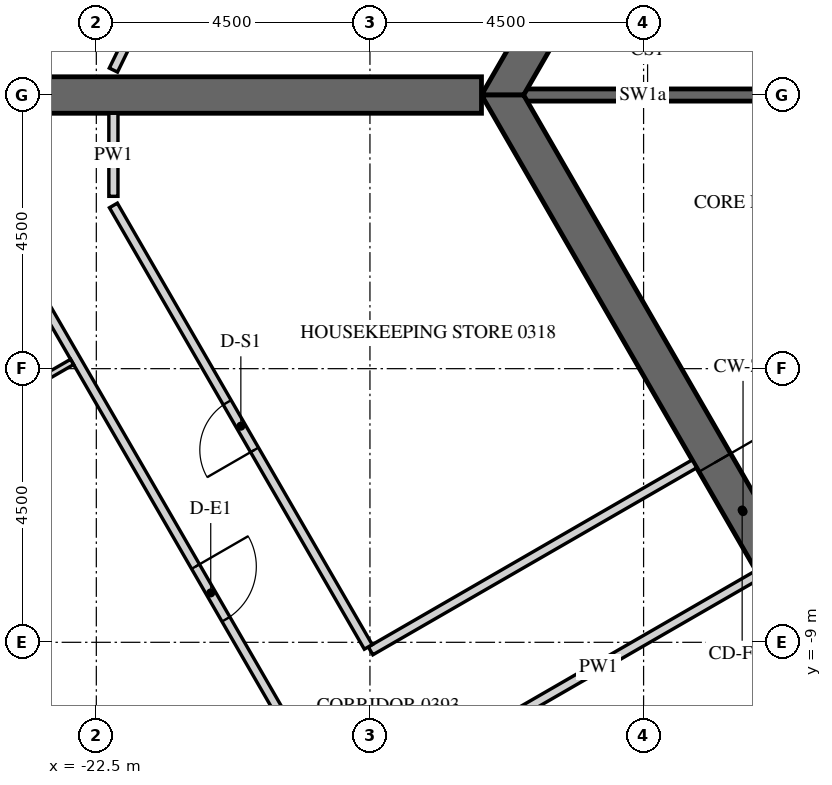
"""IFC4 building model, lengths in metres.
Left out: names, types, materials, properties, quantities, classifications, styles, units other than length and angle.
Written with IfcOpenShell. Run it as: python <this file> out.ifc"""

import sys

from ifc_helpers import new_model, si_unit, direction, frame, frame_2d, origin, place, context, subcontext, project, spatial, polyline, rectangle, outline, extrude, element, fill, save


model = new_model("IFC4")
c1 = context("Model", 3, precision=1e-05, world=origin(), true_north=direction((0.0, 1.0)))
c2 = subcontext(c1, "Body", "Model", "MODEL_VIEW")
j1 = project(units=[si_unit("LENGTHUNIT", "METRE"), si_unit("PLANEANGLEUNIT", "RADIAN")], contexts=[c1])
p1 = place(None, origin())
s1 = spatial("IfcSite", under=j1, at=p1, CompositionType="ELEMENT")
p2 = place(p1, origin())
s2 = spatial("IfcBuilding", under=s1, at=p2, CompositionType="ELEMENT")
p3 = place(p2, frame((0.0, 0.0, 60.9)))
s3 = spatial("IfcBuildingStorey", under=s2, at=p3, CompositionType="ELEMENT", Elevation=60.9)
p4 = place(p3, frame((-19.595, 27.633, -0.15), z_axis=(0.0, 0.0, 1.0), x_axis=(-0.438368285794, -0.898795441694, 0.0)))
e1 = element("IfcWall", 1, at=p4, inside=s3, PredefinedType="SOLIDWALL", context=c2, shape_type="SweptSolid", body=[
    extrude(outline(polyline([(-0.026, -0.275), (30.093, -0.275), (30.048, 0.275), (0.026, 0.275), (-0.026, -0.275)])), origin(), (0.0, 0.0, 1.0), 3.9),
])
p5 = place(p4, frame((1.236, 0.0, 1.05)))
e2 = element("IfcOpeningElement", 2, at=p5, cuts=e1, PredefinedType="OPENING", context=c2, shape_type="SweptSolid", body=[
    extrude(rectangle(XDim=2.4, YDim=2.4, at=frame_2d((1.2, 1.2))), frame((0.0, 0.285, 0.0), z_axis=(0.0, -1.0, 0.0), x_axis=(1.0, 0.0, 0.0)), (0.0, 0.0, 1.0), 0.57),
])
p6 = place(p4, frame((4.835, 0.0, 1.05)))
e3 = element("IfcOpeningElement", 3, at=p6, cuts=e1, PredefinedType="OPENING", context=c2, shape_type="SweptSolid", body=[
    extrude(rectangle(XDim=2.4, YDim=2.4, at=frame_2d((1.2, 1.2))), frame((0.0, 0.285, 0.0), z_axis=(0.0, -1.0, 0.0), x_axis=(1.0, 0.0, 0.0)), (0.0, 0.0, 1.0), 0.57),
])
p7 = place(p4, frame((8.436, 0.0, 1.05)))
e4 = element("IfcOpeningElement", 4, at=p7, cuts=e1, PredefinedType="OPENING", context=c2, shape_type="SweptSolid", body=[
    extrude(rectangle(XDim=2.4, YDim=2.4, at=frame_2d((1.2, 1.2))), frame((0.0, 0.285, 0.0), z_axis=(0.0, -1.0, 0.0), x_axis=(1.0, 0.0, 0.0)), (0.0, 0.0, 1.0), 0.57),
])
p8 = place(p4, frame((12.035, 0.0, 1.05)))
e5 = element("IfcOpeningElement", 5, at=p8, cuts=e1, PredefinedType="OPENING", context=c2, shape_type="SweptSolid", body=[
    extrude(rectangle(XDim=2.4, YDim=2.4, at=frame_2d((1.2, 1.2))), frame((0.0, 0.285, 0.0), z_axis=(0.0, -1.0, 0.0), x_axis=(1.0, 0.0, 0.0)), (0.0, 0.0, 1.0), 0.57),
])
p9 = place(p4, frame((15.635, 0.0, 1.05)))
e6 = element("IfcOpeningElement", 6, at=p9, cuts=e1, PredefinedType="OPENING", context=c2, shape_type="SweptSolid", body=[
    extrude(rectangle(XDim=2.4, YDim=2.4, at=frame_2d((1.2, 1.2))), frame((0.0, 0.285, 0.0), z_axis=(0.0, -1.0, 0.0), x_axis=(1.0, 0.0, 0.0)), (0.0, 0.0, 1.0), 0.57),
])
p10 = place(p4, frame((19.236, 0.0, 1.05)))
e7 = element("IfcOpeningElement", 7, at=p10, cuts=e1, PredefinedType="OPENING", context=c2, shape_type="SweptSolid", body=[
    extrude(rectangle(XDim=2.4, YDim=2.4, at=frame_2d((1.2, 1.2))), frame((0.0, 0.285, 0.0), z_axis=(0.0, -1.0, 0.0), x_axis=(1.0, 0.0, 0.0)), (0.0, 0.0, 1.0), 0.57),
])
p11 = place(p4, frame((22.835, 0.0, 1.05)))
e8 = element("IfcOpeningElement", 8, at=p11, cuts=e1, PredefinedType="OPENING", context=c2, shape_type="SweptSolid", body=[
    extrude(rectangle(XDim=2.4, YDim=2.4, at=frame_2d((1.2, 1.2))), frame((0.0, 0.285, 0.0), z_axis=(0.0, -1.0, 0.0), x_axis=(1.0, 0.0, 0.0)), (0.0, 0.0, 1.0), 0.57),
])
p12 = place(p4, frame((26.436, 0.0, 1.05)))
e9 = element("IfcOpeningElement", 9, at=p12, cuts=e1, PredefinedType="OPENING", context=c2, shape_type="SweptSolid", body=[
    extrude(rectangle(XDim=2.4, YDim=2.4, at=frame_2d((1.2, 1.2))), frame((0.0, 0.285, 0.0), z_axis=(0.0, -1.0, 0.0), x_axis=(1.0, 0.0, 0.0)), (0.0, 0.0, 1.0), 0.57),
])
p13 = place(p3, frame((-32.655, -2.89, -0.15), z_axis=(0.0, 0.0, 1.0), x_axis=(0.499997711317, -0.866026725152, 0.0)))
e10 = element("IfcWall", 10, at=p13, inside=s3, PredefinedType="SOLIDWALL", context=c2, shape_type="SweptSolid", body=[
    extrude(outline(polyline([(-0.022, -0.275), (30.097, -0.275), (30.045, 0.275), (0.022, 0.275), (-0.022, -0.275)])), origin(), (0.0, 0.0, 1.0), 3.9),
])
p14 = place(p13, frame((1.236, 0.0, 1.05)))
e11 = element("IfcOpeningElement", 11, at=p14, cuts=e10, PredefinedType="OPENING", context=c2, shape_type="SweptSolid", body=[
    extrude(rectangle(XDim=2.4, YDim=2.4, at=frame_2d((1.2, 1.2))), frame((0.0, 0.285, 0.0), z_axis=(0.0, -1.0, 0.0), x_axis=(1.0, 0.0, 0.0)), (0.0, 0.0, 1.0), 0.57),
])
p15 = place(p13, frame((4.835, 0.0, 1.05)))
e12 = element("IfcOpeningElement", 12, at=p15, cuts=e10, PredefinedType="OPENING", context=c2, shape_type="SweptSolid", body=[
    extrude(rectangle(XDim=2.4, YDim=2.4, at=frame_2d((1.2, 1.2))), frame((0.0, 0.285, 0.0), z_axis=(0.0, -1.0, 0.0), x_axis=(1.0, 0.0, 0.0)), (0.0, 0.0, 1.0), 0.57),
])
p16 = place(p13, frame((8.436, 0.0, 1.05)))
e13 = element("IfcOpeningElement", 13, at=p16, cuts=e10, PredefinedType="OPENING", context=c2, shape_type="SweptSolid", body=[
    extrude(rectangle(XDim=2.4, YDim=2.4, at=frame_2d((1.2, 1.2))), frame((0.0, 0.285, 0.0), z_axis=(0.0, -1.0, 0.0), x_axis=(1.0, 0.0, 0.0)), (0.0, 0.0, 1.0), 0.57),
])
p17 = place(p13, frame((12.035, 0.0, 1.05)))
e14 = element("IfcOpeningElement", 14, at=p17, cuts=e10, PredefinedType="OPENING", context=c2, shape_type="SweptSolid", body=[
    extrude(rectangle(XDim=2.4, YDim=2.4, at=frame_2d((1.2, 1.2))), frame((0.0, 0.285, 0.0), z_axis=(0.0, -1.0, 0.0), x_axis=(1.0, 0.0, 0.0)), (0.0, 0.0, 1.0), 0.57),
])
p18 = place(p13, frame((15.635, 0.0, 1.05)))
e15 = element("IfcOpeningElement", 15, at=p18, cuts=e10, PredefinedType="OPENING", context=c2, shape_type="SweptSolid", body=[
    extrude(rectangle(XDim=2.4, YDim=2.4, at=frame_2d((1.2, 1.2))), frame((0.0, 0.285, 0.0), z_axis=(0.0, -1.0, 0.0), x_axis=(1.0, 0.0, 0.0)), (0.0, 0.0, 1.0), 0.57),
])
p19 = place(p13, frame((19.236, 0.0, 1.05)))
e16 = element("IfcOpeningElement", 16, at=p19, cuts=e10, PredefinedType="OPENING", context=c2, shape_type="SweptSolid", body=[
    extrude(rectangle(XDim=2.4, YDim=2.4, at=frame_2d((1.2, 1.2))), frame((0.0, 0.285, 0.0), z_axis=(0.0, -1.0, 0.0), x_axis=(1.0, 0.0, 0.0)), (0.0, 0.0, 1.0), 0.57),
])
p20 = place(p13, frame((22.835, 0.0, 1.05)))
e17 = element("IfcOpeningElement", 17, at=p20, cuts=e10, PredefinedType="OPENING", context=c2, shape_type="SweptSolid", body=[
    extrude(rectangle(XDim=2.4, YDim=2.4, at=frame_2d((1.2, 1.2))), frame((0.0, 0.285, 0.0), z_axis=(0.0, -1.0, 0.0), x_axis=(1.0, 0.0, 0.0)), (0.0, 0.0, 1.0), 0.57),
])
p21 = place(p13, frame((26.436, 0.0, 1.05)))
e18 = element("IfcOpeningElement", 18, at=p21, cuts=e10, PredefinedType="OPENING", context=c2, shape_type="SweptSolid", body=[
    extrude(rectangle(XDim=2.4, YDim=2.4, at=frame_2d((1.2, 1.2))), frame((0.0, 0.285, 0.0), z_axis=(0.0, -1.0, 0.0), x_axis=(1.0, 0.0, 0.0)), (0.0, 0.0, 1.0), 0.57),
])
p22 = place(p3, frame((-7.91, 13.7, -0.15), z_axis=(0.0, 0.0, 1.0), x_axis=(-0.499999880136, -0.866025472988, 0.0)))
e19 = element("IfcWall", 19, at=p22, inside=s3, PredefinedType="SHEAR", context=c2, shape_type="SweptSolid", body=[
    extrude(outline(polyline([(-0.173, -0.3), (15.993, -0.3), (15.646, 0.3), (0.173, 0.3), (-0.173, -0.3)])), origin(), (0.0, 0.0, 1.0), 3.9),
])
p23 = place(p22, frame((7.039, 0.0, 0.15)))
e20 = element("IfcOpeningElement", 20, at=p23, cuts=e19, PredefinedType="OPENING", context=c2, shape_type="SweptSolid", body=[
    extrude(rectangle(XDim=1.8, YDim=2.4, at=frame_2d((0.9, 1.2))), frame((0.0, 0.31, 0.0), z_axis=(0.0, -1.0, 0.0), x_axis=(1.0, 0.0, 0.0)), (0.0, 0.0, 1.0), 0.62),
])
p24 = place(p3, frame((-15.819, 0.0, -0.15), z_axis=(0.0, 0.0, 1.0), x_axis=(0.499999880136, -0.866025472988, 0.0)))
e21 = element("IfcWall", 21, at=p24, inside=s3, PredefinedType="SHEAR", context=c2, shape_type="SweptSolid", body=[
    extrude(outline(polyline([(-0.173, -0.3), (15.993, -0.3), (15.646, 0.3), (0.173, 0.3), (-0.173, -0.3)])), origin(), (0.0, 0.0, 1.0), 3.9),
])
p25 = place(p24, frame((6.981, 0.0, 0.15)))
e22 = element("IfcOpeningElement", 22, at=p25, cuts=e21, PredefinedType="OPENING", context=c2, shape_type="SweptSolid", body=[
    extrude(rectangle(XDim=1.8, YDim=2.4, at=frame_2d((0.9, 1.2))), frame((0.0, 0.31, 0.0), z_axis=(0.0, -1.0, 0.0), x_axis=(1.0, 0.0, 0.0)), (0.0, 0.0, 1.0), 0.62),
])
p26 = place(p3, frame((-16.166, 0.0, -0.15), z_axis=(0.0, 0.0, 1.0), x_axis=(-1.0, 0.0, 0.0)))
e23 = element("IfcWall", 23, at=p26, inside=s3, PredefinedType="SHEAR", context=c2, shape_type="SweptSolid", body=[
    extrude(rectangle(XDim=16.509, YDim=0.6, at=frame_2d((8.254, 0.0))), origin(), (0.0, 0.0, 1.0), 3.9),
])
p27 = place(p26, frame((7.354, 0.0, 0.15)))
e24 = element("IfcOpeningElement", 24, at=p27, cuts=e23, PredefinedType="OPENING", context=c2, shape_type="SweptSolid", body=[
    extrude(rectangle(XDim=1.8, YDim=2.4, at=frame_2d((0.9, 1.2))), frame((0.0, 0.31, 0.0), z_axis=(0.0, -1.0, 0.0), x_axis=(1.0, 0.0, 0.0)), (0.0, 0.0, 1.0), 0.62),
])
p28 = place(p3, frame((-11.547, 0.0, -0.15), z_axis=(0.0, 0.0, 1.0), x_axis=(-1.0, 0.0, 0.0)))
e25 = element("IfcWall", 25, at=p28, inside=s3, PredefinedType="SHEAR", context=c2, shape_type="SweptSolid", body=[
    extrude(rectangle(XDim=3.926, YDim=0.2, at=frame_2d((1.963, 0.0))), origin(), (0.0, 0.0, 1.0), 3.9),
])
p29 = place(p3, frame((-22.219, 0.41, 0.0), z_axis=(0.0, 0.0, 1.0), x_axis=(0.438391891827, 0.898783927972, 0.0)))
e26 = element("IfcWall", 26, at=p29, inside=s3, PredefinedType="PARTITIONING", context=c2, shape_type="SweptSolid", body=[
    extrude(rectangle(XDim=9.699, YDim=0.15, at=frame_2d((4.85, 0.0))), origin(), (0.0, 0.0, 1.0), 2.988),
])
p30 = place(p29, frame((4.4, 0.0, 0.0)))
e27 = element("IfcOpeningElement", 27, at=p30, cuts=e26, PredefinedType="OPENING", context=c2, shape_type="SweptSolid", body=[
    extrude(rectangle(XDim=0.9, YDim=2.1, at=frame_2d((0.45, 1.05))), frame((0.0, 0.085, 0.0), z_axis=(0.0, -1.0, 0.0), x_axis=(1.0, 0.0, 0.0)), (0.0, 0.0, 1.0), 0.17),
])
p31 = place(p3, frame((-24.09, -2.175, 0.0), z_axis=(0.0, 0.0, 1.0), x_axis=(0.499996832073, -0.86602723278, 0.0)))
e28 = element("IfcWall", 28, at=p31, inside=s3, PredefinedType="PARTITIONING", context=c2, shape_type="SweptSolid", body=[
    extrude(rectangle(XDim=23.877, YDim=0.15, at=frame_2d((11.938, 0.0))), origin(), (0.0, 0.0, 1.0), 2.988),
])
p32 = place(p31, frame((6.443, 0.0, 0.0)))
e29 = element("IfcOpeningElement", 29, at=p32, cuts=e28, PredefinedType="OPENING", context=c2, shape_type="SweptSolid", body=[
    extrude(rectangle(XDim=1.0, YDim=2.1, at=frame_2d((0.5, 1.05))), frame((0.0, 0.085, 0.0), z_axis=(0.0, -1.0, 0.0), x_axis=(1.0, 0.0, 0.0)), (0.0, 0.0, 1.0), 0.17),
])
p33 = place(p31, frame((18.425, 0.0, 0.0)))
e30 = element("IfcOpeningElement", 30, at=p33, cuts=e28, PredefinedType="OPENING", context=c2, shape_type="SweptSolid", body=[
    extrude(rectangle(XDim=1.0, YDim=2.1, at=frame_2d((0.5, 1.05))), frame((0.0, 0.085, 0.0), z_axis=(0.0, -1.0, 0.0), x_axis=(1.0, 0.0, 0.0)), (0.0, 0.0, 1.0), 0.17),
])
p34 = place(p3, frame((-12.664, -6.066, 0.0), z_axis=(0.0, 0.0, 1.0), x_axis=(-0.866023618125, -0.500003092839, 0.0)))
e31 = element("IfcWall", 31, at=p34, inside=s3, PredefinedType="PARTITIONING", context=c2, shape_type="SweptSolid", body=[
    extrude(rectangle(XDim=6.15, YDim=0.15, at=frame_2d((3.075, 0.0))), origin(), (0.0, 0.0, 1.0), 2.988),
])
p35 = place(p3, frame((-18.027, -9.076, 0.0), z_axis=(0.0, 0.0, 1.0), x_axis=(-0.500007318041, 0.86602117867, 0.0)))
e32 = element("IfcWall", 32, at=p35, inside=s3, PredefinedType="PARTITIONING", context=c2, shape_type="SweptSolid", body=[
    extrude(rectangle(XDim=8.383, YDim=0.15, at=frame_2d((4.191, 0.0))), origin(), (0.0, 0.0, 1.0), 2.988),
])
p36 = place(p35, frame((3.742, 0.0, 0.0)))
e33 = element("IfcOpeningElement", 33, at=p36, cuts=e32, PredefinedType="OPENING", context=c2, shape_type="SweptSolid", body=[
    extrude(rectangle(XDim=0.9, YDim=2.1, at=frame_2d((0.45, 1.05))), frame((0.0, 0.085, 0.0), z_axis=(0.0, -1.0, 0.0), x_axis=(1.0, 0.0, 0.0)), (0.0, 0.0, 1.0), 0.17),
])
p37 = place(p3, frame((-22.219, -1.666, 0.0), z_axis=(0.0, 0.0, 1.0), x_axis=(0.0, 1.0, 0.0)))
e34 = element("IfcWall", 34, at=p37, inside=s3, PredefinedType="PARTITIONING", context=c2, shape_type="SweptSolid", body=[
    extrude(rectangle(XDim=1.366, YDim=0.15, at=frame_2d((0.683, 0.0))), origin(), (0.0, 0.0, 1.0), 2.988),
])
p38 = place(p3, frame((-16.875, -10.922, 0.0), z_axis=(0.0, 0.0, 1.0), x_axis=(0.866023634079, 0.500003065207, 0.0)))
e35 = element("IfcWall", 35, at=p38, inside=s3, PredefinedType="PARTITIONING", context=c2, shape_type="SweptSolid", body=[
    extrude(rectangle(XDim=6.075, YDim=0.15, at=frame_2d((3.038, 0.0))), origin(), (0.0, 0.0, 1.0), 2.988),
])
p39 = place(p3, frame((-22.898, -4.389, 0.0), z_axis=(0.0, 0.0, 1.0), x_axis=(-0.866012511928, -0.500022328685, 0.0)))
e36 = element("IfcWall", 36, at=p39, inside=s3, PredefinedType="PARTITIONING", context=c2, shape_type="SweptSolid", body=[
    extrude(rectangle(XDim=2.725, YDim=0.1, at=frame_2d((1.363, 0.0))), origin(), (0.0, 0.0, 1.0), 2.988),
])
p40 = place(p39, frame((0.925, 0.0, 0.0)))
e37 = element("IfcOpeningElement", 37, at=p40, cuts=e36, PredefinedType="OPENING", context=c2, shape_type="SweptSolid", body=[
    extrude(rectangle(XDim=0.8, YDim=2.1, at=frame_2d((0.4, 1.05))), frame((0.0, 0.06, 0.0), z_axis=(0.0, -1.0, 0.0), x_axis=(1.0, 0.0, 0.0)), (0.0, 0.0, 1.0), 0.12),
])
p41 = place(p3, frame((-25.616, -7.932, 0.0), z_axis=(0.0, 0.0, 1.0), x_axis=(0.499995846692, -0.866027801685, 0.0)))
e38 = element("IfcWall", 38, at=p41, inside=s3, PredefinedType="PARTITIONING", context=c2, shape_type="SweptSolid", body=[
    extrude(rectangle(XDim=7.06, YDim=0.1, at=frame_2d((3.53, 0.0))), origin(), (0.0, 0.0, 1.0), 2.988),
])
p42 = place(p41, frame((3.1, 0.0, 0.0)))
e39 = element("IfcOpeningElement", 39, at=p42, cuts=e38, PredefinedType="OPENING", context=c2, shape_type="SweptSolid", body=[
    extrude(rectangle(XDim=0.9, YDim=2.1, at=frame_2d((0.45, 1.05))), frame((0.0, 0.06, 0.0), z_axis=(0.0, -1.0, 0.0), x_axis=(1.0, 0.0, 0.0)), (0.0, 0.0, 1.0), 0.12),
])
p43 = place(p25, origin())
e40 = element("IfcDoor", 40, at=p43, inside=s3, OperationType="DOUBLE_DOOR_SINGLE_SWING", PredefinedType="DOOR", context=c2, shape_type="SweptSolid", body=[
    extrude(rectangle(XDim=1.8, YDim=2.4, at=frame_2d((0.9, 1.2))), frame((0.0, 0.025, 0.0), z_axis=(0.0, -1.0, 0.0), x_axis=(1.0, 0.0, 0.0)), (0.0, 0.0, 1.0), 0.05),
])
fill(e22, e40)
p44 = place(p32, origin())
e41 = element("IfcDoor", 41, at=p44, inside=s3, OperationType="SINGLE_SWING_LEFT", PredefinedType="DOOR", context=c2, shape_type="SweptSolid", body=[
    extrude(rectangle(XDim=1.0, YDim=2.1, at=frame_2d((0.5, 1.05))), frame((0.0, 0.025, 0.0), z_axis=(0.0, -1.0, 0.0), x_axis=(1.0, 0.0, 0.0)), (0.0, 0.0, 1.0), 0.05),
])
fill(e29, e41)
p45 = place(p36, origin())
e42 = element("IfcDoor", 42, at=p45, inside=s3, OperationType="SINGLE_SWING_RIGHT", PredefinedType="DOOR", context=c2, shape_type="SweptSolid", body=[
    extrude(rectangle(XDim=0.9, YDim=2.1, at=frame_2d((0.45, 1.05))), frame((0.0, 0.025, 0.0), z_axis=(0.0, -1.0, 0.0), x_axis=(1.0, 0.0, 0.0)), (0.0, 0.0, 1.0), 0.05),
])
fill(e33, e42)
save(model, sys.argv[1])
